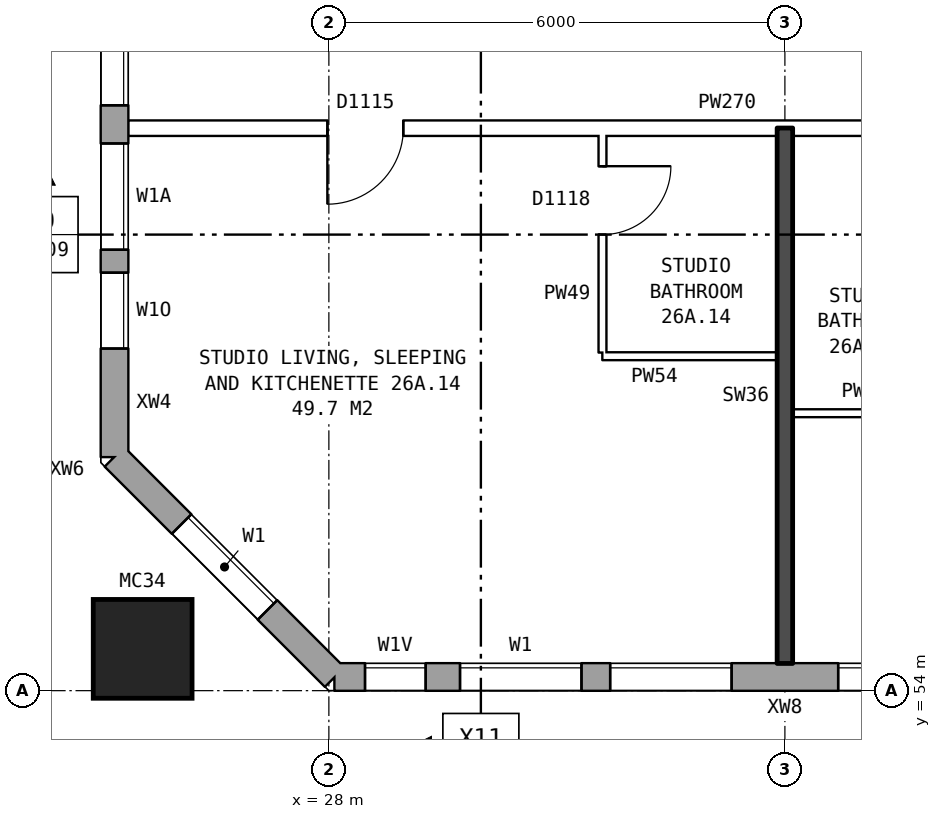
"""IFC4 building model, lengths in metres.
Left out: names, types, materials, properties, quantities, classifications, styles, units other than length and angle.
Written with IfcOpenShell. Run it as: python <this file> out.ifc"""

import sys

from ifc_helpers import new_model, si_unit, direction, frame, frame_2d, origin, origin_2d, place, context, subcontext, project, spatial, rectangle, hollow_rectangle, extrude, element, fill, save


model = new_model("IFC4")
c1 = context("Model", 3, precision=1e-05, world=origin(), true_north=direction((0.0, 1.0)))
c2 = subcontext(c1, "Body", "Model", "MODEL_VIEW")
j1 = project(units=[si_unit("LENGTHUNIT", "METRE"), si_unit("PLANEANGLEUNIT", "RADIAN")], contexts=[c1])
p1 = place(None, origin())
s1 = spatial("IfcSite", under=j1, at=p1, CompositionType="ELEMENT")
p2 = place(p1, origin())
s2 = spatial("IfcBuilding", under=s1, at=p2, CompositionType="ELEMENT")
p3 = place(p2, frame((0.0, 0.0, 96.4)))
s3 = spatial("IfcBuildingStorey", under=s2, at=p3, CompositionType="ELEMENT", Elevation=96.4)
p4 = place(p3, frame((25.55, 54.55, 0.0), z_axis=(0.0, 0.0, 1.0), x_axis=(1.0, 0.0, 0.0)))
e1 = element("IfcColumn", 1, at=p4, inside=s3, PredefinedType="COLUMN", context=c2, shape_type="SweptSolid", body=[
    extrude(hollow_rectangle(XDim=1.3, YDim=1.3, WallThickness=0.07, at=origin_2d()), origin(), (0.0, 0.0, 1.0), 3.1),
])
p5 = place(p3, frame((25.18, 57.075, 0.0), z_axis=(0.0, 0.0, 1.0), x_axis=(0.707106781187, -0.707106781187, 0.0)))
e2 = element("IfcWall", 2, at=p5, inside=s3, PredefinedType="STANDARD", context=c2, shape_type="SweptSolid", body=[
    extrude(rectangle(XDim=4.094, YDim=0.36, at=frame_2d((2.047, 0.0))), origin(), (0.0, 0.0, 1.0), 2.85),
])
p6 = place(p5, frame((1.247, 0.0, 0.8)))
e3 = element("IfcOpeningElement", 3, at=p6, cuts=e2, PredefinedType="OPENING", context=c2, shape_type="SweptSolid", body=[
    extrude(rectangle(XDim=1.6, YDim=1.8, at=frame_2d((0.8, 0.9))), frame((0.0, 0.19, 0.0), z_axis=(0.0, -1.0, 0.0), x_axis=(1.0, 0.0, 0.0)), (0.0, 0.0, 1.0), 0.38),
])
p7 = place(p3, frame((28.075, 54.18, 0.0), z_axis=(0.0, 0.0, 1.0), x_axis=(1.0, 0.0, 0.0)))
e4 = element("IfcWall", 4, at=p7, inside=s3, PredefinedType="STANDARD", context=c2, shape_type="SweptSolid", body=[
    extrude(rectangle(XDim=44.851, YDim=0.36, at=frame_2d((22.425, 0.0))), origin(), (0.0, 0.0, 1.0), 2.85),
])
p8 = place(p7, frame((0.4, 0.0, 0.8)))
e5 = element("IfcOpeningElement", 5, at=p8, cuts=e4, PredefinedType="OPENING", context=c2, shape_type="SweptSolid", body=[
    extrude(rectangle(XDim=0.8, YDim=0.9, at=frame_2d((0.4, 0.45))), frame((0.0, 0.19, 0.0), z_axis=(0.0, -1.0, 0.0), x_axis=(1.0, 0.0, 0.0)), (0.0, 0.0, 1.0), 0.38),
])
p9 = place(p7, frame((3.625, 0.0, 0.8)))
e6 = element("IfcOpeningElement", 6, at=p9, cuts=e4, PredefinedType="OPENING", context=c2, shape_type="SweptSolid", body=[
    extrude(rectangle(XDim=1.6, YDim=1.8, at=frame_2d((0.8, 0.9))), frame((0.0, 0.19, 0.0), z_axis=(0.0, -1.0, 0.0), x_axis=(1.0, 0.0, 0.0)), (0.0, 0.0, 1.0), 0.38),
])
p10 = place(p7, frame((6.625, 0.0, 0.8)))
e7 = element("IfcOpeningElement", 7, at=p10, cuts=e4, PredefinedType="OPENING", context=c2, shape_type="SweptSolid", body=[
    extrude(rectangle(XDim=1.6, YDim=1.8, at=frame_2d((0.8, 0.9))), frame((0.0, 0.19, 0.0), z_axis=(0.0, -1.0, 0.0), x_axis=(1.0, 0.0, 0.0)), (0.0, 0.0, 1.0), 0.38),
])
p11 = place(p7, frame((9.625, 0.0, 0.8)))
e8 = element("IfcOpeningElement", 8, at=p11, cuts=e4, PredefinedType="OPENING", context=c2, shape_type="SweptSolid", body=[
    extrude(rectangle(XDim=1.6, YDim=1.8, at=frame_2d((0.8, 0.9))), frame((0.0, 0.19, 0.0), z_axis=(0.0, -1.0, 0.0), x_axis=(1.0, 0.0, 0.0)), (0.0, 0.0, 1.0), 0.38),
])
p12 = place(p7, frame((12.625, 0.0, 0.8)))
e9 = element("IfcOpeningElement", 9, at=p12, cuts=e4, PredefinedType="OPENING", context=c2, shape_type="SweptSolid", body=[
    extrude(rectangle(XDim=1.6, YDim=1.8, at=frame_2d((0.8, 0.9))), frame((0.0, 0.19, 0.0), z_axis=(0.0, -1.0, 0.0), x_axis=(1.0, 0.0, 0.0)), (0.0, 0.0, 1.0), 0.38),
])
p13 = place(p7, frame((15.625, 0.0, 0.8)))
e10 = element("IfcOpeningElement", 10, at=p13, cuts=e4, PredefinedType="OPENING", context=c2, shape_type="SweptSolid", body=[
    extrude(rectangle(XDim=1.6, YDim=1.8, at=frame_2d((0.8, 0.9))), frame((0.0, 0.19, 0.0), z_axis=(0.0, -1.0, 0.0), x_axis=(1.0, 0.0, 0.0)), (0.0, 0.0, 1.0), 0.38),
])
p14 = place(p7, frame((18.625, 0.0, 0.8)))
e11 = element("IfcOpeningElement", 11, at=p14, cuts=e4, PredefinedType="OPENING", context=c2, shape_type="SweptSolid", body=[
    extrude(rectangle(XDim=1.6, YDim=1.8, at=frame_2d((0.8, 0.9))), frame((0.0, 0.19, 0.0), z_axis=(0.0, -1.0, 0.0), x_axis=(1.0, 0.0, 0.0)), (0.0, 0.0, 1.0), 0.38),
])
p15 = place(p7, frame((21.625, 0.0, 0.8)))
e12 = element("IfcOpeningElement", 12, at=p15, cuts=e4, PredefinedType="OPENING", context=c2, shape_type="SweptSolid", body=[
    extrude(rectangle(XDim=1.6, YDim=1.8, at=frame_2d((0.8, 0.9))), frame((0.0, 0.19, 0.0), z_axis=(0.0, -1.0, 0.0), x_axis=(1.0, 0.0, 0.0)), (0.0, 0.0, 1.0), 0.38),
])
p16 = place(p7, frame((24.625, 0.0, 0.8)))
e13 = element("IfcOpeningElement", 13, at=p16, cuts=e4, PredefinedType="OPENING", context=c2, shape_type="SweptSolid", body=[
    extrude(rectangle(XDim=1.6, YDim=1.8, at=frame_2d((0.8, 0.9))), frame((0.0, 0.19, 0.0), z_axis=(0.0, -1.0, 0.0), x_axis=(1.0, 0.0, 0.0)), (0.0, 0.0, 1.0), 0.38),
])
p17 = place(p7, frame((27.625, 0.0, 0.8)))
e14 = element("IfcOpeningElement", 14, at=p17, cuts=e4, PredefinedType="OPENING", context=c2, shape_type="SweptSolid", body=[
    extrude(rectangle(XDim=1.6, YDim=1.8, at=frame_2d((0.8, 0.9))), frame((0.0, 0.19, 0.0), z_axis=(0.0, -1.0, 0.0), x_axis=(1.0, 0.0, 0.0)), (0.0, 0.0, 1.0), 0.38),
])
p18 = place(p7, frame((30.625, 0.0, 0.8)))
e15 = element("IfcOpeningElement", 15, at=p18, cuts=e4, PredefinedType="OPENING", context=c2, shape_type="SweptSolid", body=[
    extrude(rectangle(XDim=1.6, YDim=1.8, at=frame_2d((0.8, 0.9))), frame((0.0, 0.19, 0.0), z_axis=(0.0, -1.0, 0.0), x_axis=(1.0, 0.0, 0.0)), (0.0, 0.0, 1.0), 0.38),
])
p19 = place(p7, frame((33.625, 0.0, 0.8)))
e16 = element("IfcOpeningElement", 16, at=p19, cuts=e4, PredefinedType="OPENING", context=c2, shape_type="SweptSolid", body=[
    extrude(rectangle(XDim=1.6, YDim=1.8, at=frame_2d((0.8, 0.9))), frame((0.0, 0.19, 0.0), z_axis=(0.0, -1.0, 0.0), x_axis=(1.0, 0.0, 0.0)), (0.0, 0.0, 1.0), 0.38),
])
p20 = place(p7, frame((36.625, 0.0, 0.8)))
e17 = element("IfcOpeningElement", 17, at=p20, cuts=e4, PredefinedType="OPENING", context=c2, shape_type="SweptSolid", body=[
    extrude(rectangle(XDim=1.6, YDim=1.8, at=frame_2d((0.8, 0.9))), frame((0.0, 0.19, 0.0), z_axis=(0.0, -1.0, 0.0), x_axis=(1.0, 0.0, 0.0)), (0.0, 0.0, 1.0), 0.38),
])
p21 = place(p7, frame((39.625, 0.0, 0.8)))
e18 = element("IfcOpeningElement", 18, at=p21, cuts=e4, PredefinedType="OPENING", context=c2, shape_type="SweptSolid", body=[
    extrude(rectangle(XDim=1.6, YDim=1.8, at=frame_2d((0.8, 0.9))), frame((0.0, 0.19, 0.0), z_axis=(0.0, -1.0, 0.0), x_axis=(1.0, 0.0, 0.0)), (0.0, 0.0, 1.0), 0.38),
])
p22 = place(p7, frame((42.125, 0.0, 0.8)))
e19 = element("IfcOpeningElement", 19, at=p22, cuts=e4, PredefinedType="OPENING", context=c2, shape_type="SweptSolid", body=[
    extrude(rectangle(XDim=1.0, YDim=1.8, at=frame_2d((0.5, 0.9))), frame((0.0, 0.19, 0.0), z_axis=(0.0, -1.0, 0.0), x_axis=(1.0, 0.0, 0.0)), (0.0, 0.0, 1.0), 0.38),
])
p23 = place(p7, frame((1.65, 0.0, 0.8)))
e20 = element("IfcOpeningElement", 20, at=p23, cuts=e4, PredefinedType="OPENING", context=c2, shape_type="SweptSolid", body=[
    extrude(rectangle(XDim=1.6, YDim=1.8, at=frame_2d((0.8, 0.9))), frame((0.0, 0.19, 0.0), z_axis=(0.0, -1.0, 0.0), x_axis=(1.0, 0.0, 0.0)), (0.0, 0.0, 1.0), 0.38),
])
p24 = place(p7, frame((43.425, 0.0, 0.8)))
e21 = element("IfcOpeningElement", 21, at=p24, cuts=e4, PredefinedType="OPENING", context=c2, shape_type="SweptSolid", body=[
    extrude(rectangle(XDim=1.0, YDim=0.9, at=frame_2d((0.5, 0.45))), frame((0.0, 0.19, 0.0), z_axis=(0.0, -1.0, 0.0), x_axis=(1.0, 0.0, 0.0)), (0.0, 0.0, 1.0), 0.38),
])
p25 = place(p3, frame((25.18, 82.925, 0.0), z_axis=(0.0, 0.0, 1.0), x_axis=(0.0, -1.0, 0.0)))
e22 = element("IfcWall", 22, at=p25, inside=s3, PredefinedType="STANDARD", context=c2, shape_type="SweptSolid", body=[
    extrude(rectangle(XDim=25.851, YDim=0.36, at=frame_2d((12.925, 0.0))), origin(), (0.0, 0.0, 1.0), 2.85),
])
p26 = place(p25, frame((0.9, 0.0, 0.8)))
e23 = element("IfcOpeningElement", 23, at=p26, cuts=e22, PredefinedType="OPENING", context=c2, shape_type="SweptSolid", body=[
    extrude(rectangle(XDim=0.8, YDim=0.9, at=frame_2d((0.4, 0.45))), frame((0.0, 0.19, 0.0), z_axis=(0.0, -1.0, 0.0), x_axis=(1.0, 0.0, 0.0)), (0.0, 0.0, 1.0), 0.38),
])
p27 = place(p25, frame((4.625, 0.0, 0.8)))
e24 = element("IfcOpeningElement", 24, at=p27, cuts=e22, PredefinedType="OPENING", context=c2, shape_type="SweptSolid", body=[
    extrude(rectangle(XDim=1.6, YDim=1.8, at=frame_2d((0.8, 0.9))), frame((0.0, 0.19, 0.0), z_axis=(0.0, -1.0, 0.0), x_axis=(1.0, 0.0, 0.0)), (0.0, 0.0, 1.0), 0.38),
])
p28 = place(p25, frame((7.625, 0.0, 0.8)))
e25 = element("IfcOpeningElement", 25, at=p28, cuts=e22, PredefinedType="OPENING", context=c2, shape_type="SweptSolid", body=[
    extrude(rectangle(XDim=1.6, YDim=1.8, at=frame_2d((0.8, 0.9))), frame((0.0, 0.19, 0.0), z_axis=(0.0, -1.0, 0.0), x_axis=(1.0, 0.0, 0.0)), (0.0, 0.0, 1.0), 0.38),
])
p29 = place(p25, frame((10.625, 0.0, 0.8)))
e26 = element("IfcOpeningElement", 26, at=p29, cuts=e22, PredefinedType="OPENING", context=c2, shape_type="SweptSolid", body=[
    extrude(rectangle(XDim=1.6, YDim=1.8, at=frame_2d((0.8, 0.9))), frame((0.0, 0.19, 0.0), z_axis=(0.0, -1.0, 0.0), x_axis=(1.0, 0.0, 0.0)), (0.0, 0.0, 1.0), 0.38),
])
p30 = place(p25, frame((13.625, 0.0, 0.8)))
e27 = element("IfcOpeningElement", 27, at=p30, cuts=e22, PredefinedType="OPENING", context=c2, shape_type="SweptSolid", body=[
    extrude(rectangle(XDim=1.6, YDim=1.8, at=frame_2d((0.8, 0.9))), frame((0.0, 0.19, 0.0), z_axis=(0.0, -1.0, 0.0), x_axis=(1.0, 0.0, 0.0)), (0.0, 0.0, 1.0), 0.38),
])
p31 = place(p25, frame((16.625, 0.0, 0.8)))
e28 = element("IfcOpeningElement", 28, at=p31, cuts=e22, PredefinedType="OPENING", context=c2, shape_type="SweptSolid", body=[
    extrude(rectangle(XDim=1.6, YDim=1.8, at=frame_2d((0.8, 0.9))), frame((0.0, 0.19, 0.0), z_axis=(0.0, -1.0, 0.0), x_axis=(1.0, 0.0, 0.0)), (0.0, 0.0, 1.0), 0.38),
])
p32 = place(p25, frame((19.625, 0.0, 0.8)))
e29 = element("IfcOpeningElement", 29, at=p32, cuts=e22, PredefinedType="OPENING", context=c2, shape_type="SweptSolid", body=[
    extrude(rectangle(XDim=1.6, YDim=1.8, at=frame_2d((0.8, 0.9))), frame((0.0, 0.19, 0.0), z_axis=(0.0, -1.0, 0.0), x_axis=(1.0, 0.0, 0.0)), (0.0, 0.0, 1.0), 0.38),
])
p33 = place(p25, frame((21.725, 0.0, 0.8)))
e30 = element("IfcOpeningElement", 30, at=p33, cuts=e22, PredefinedType="OPENING", context=c2, shape_type="SweptSolid", body=[
    extrude(rectangle(XDim=1.4, YDim=1.8, at=frame_2d((0.7, 0.9))), frame((0.0, 0.19, 0.0), z_axis=(0.0, -1.0, 0.0), x_axis=(1.0, 0.0, 0.0)), (0.0, 0.0, 1.0), 0.38),
])
p34 = place(p25, frame((2.0, 0.0, 0.8)))
e31 = element("IfcOpeningElement", 31, at=p34, cuts=e22, PredefinedType="OPENING", context=c2, shape_type="SweptSolid", body=[
    extrude(rectangle(XDim=0.8, YDim=1.5, at=frame_2d((0.4, 0.75))), frame((0.0, 0.19, 0.0), z_axis=(0.0, -1.0, 0.0), x_axis=(1.0, 0.0, 0.0)), (0.0, 0.0, 1.0), 0.38),
])
p35 = place(p25, frame((3.1, 0.0, 0.8)))
e32 = element("IfcOpeningElement", 32, at=p35, cuts=e22, PredefinedType="OPENING", context=c2, shape_type="SweptSolid", body=[
    extrude(rectangle(XDim=1.0, YDim=1.8, at=frame_2d((0.5, 0.9))), frame((0.0, 0.19, 0.0), z_axis=(0.0, -1.0, 0.0), x_axis=(1.0, 0.0, 0.0)), (0.0, 0.0, 1.0), 0.38),
])
p36 = place(p25, frame((23.425, 0.0, 0.8)))
e33 = element("IfcOpeningElement", 33, at=p36, cuts=e22, PredefinedType="OPENING", context=c2, shape_type="SweptSolid", body=[
    extrude(rectangle(XDim=1.0, YDim=1.2, at=frame_2d((0.5, 0.6))), frame((0.0, 0.19, 0.0), z_axis=(0.0, -1.0, 0.0), x_axis=(1.0, 0.0, 0.0)), (0.0, 0.0, 1.0), 0.38),
])
p37 = place(p3, frame((34.1, 57.65, 0.0), z_axis=(0.0, 0.0, 1.0), x_axis=(1.0, 0.0, 0.0)))
e34 = element("IfcWall", 34, at=p37, inside=s3, PredefinedType="PARTITIONING", context=c2, shape_type="SweptSolid", body=[
    extrude(rectangle(XDim=1.9, YDim=0.1, at=frame_2d((0.95, 0.0))), origin(), (0.0, 0.0, 1.0), 2.85),
])
p38 = place(p3, frame((31.6, 58.4, 0.0), z_axis=(0.0, 0.0, 1.0), x_axis=(1.0, 0.0, 0.0)))
e35 = element("IfcWall", 35, at=p38, inside=s3, PredefinedType="PARTITIONING", context=c2, shape_type="SweptSolid", body=[
    extrude(rectangle(XDim=2.3, YDim=0.1, at=frame_2d((1.15, 0.0))), origin(), (0.0, 0.0, 1.0), 2.85),
])
p39 = place(p3, frame((25.36, 61.4, 0.0), z_axis=(0.0, 0.0, 1.0), x_axis=(1.0, 0.0, 0.0)))
e36 = element("IfcWall", 36, at=p39, inside=s3, PredefinedType="PARTITIONING", context=c2, shape_type="SweptSolid", body=[
    extrude(rectangle(XDim=20.54, YDim=0.2, at=frame_2d((10.27, 0.0))), origin(), (0.0, 0.0, 1.0), 2.85),
])
p40 = place(p39, frame((18.09, 0.0, 0.0)))
e37 = element("IfcOpeningElement", 37, at=p40, cuts=e36, PredefinedType="OPENING", context=c2, shape_type="SweptSolid", body=[
    extrude(rectangle(XDim=1.0, YDim=2.1, at=frame_2d((0.5, 1.05))), frame((0.0, 0.11, 0.0), z_axis=(0.0, -1.0, 0.0), x_axis=(1.0, 0.0, 0.0)), (0.0, 0.0, 1.0), 0.22),
])
p41 = place(p39, frame((12.14, 0.0, 0.0)))
e38 = element("IfcOpeningElement", 38, at=p41, cuts=e36, PredefinedType="OPENING", context=c2, shape_type="SweptSolid", body=[
    extrude(rectangle(XDim=1.0, YDim=2.1, at=frame_2d((0.5, 1.05))), frame((0.0, 0.11, 0.0), z_axis=(0.0, -1.0, 0.0), x_axis=(1.0, 0.0, 0.0)), (0.0, 0.0, 1.0), 0.22),
])
p42 = place(p39, frame((2.62, 0.0, 0.0)))
e39 = element("IfcOpeningElement", 39, at=p42, cuts=e36, PredefinedType="OPENING", context=c2, shape_type="SweptSolid", body=[
    extrude(rectangle(XDim=1.0, YDim=2.1, at=frame_2d((0.5, 1.05))), frame((0.0, 0.11, 0.0), z_axis=(0.0, -1.0, 0.0), x_axis=(1.0, 0.0, 0.0)), (0.0, 0.0, 1.0), 0.22),
])
p43 = place(p3, frame((31.6, 58.45, 0.0), z_axis=(0.0, 0.0, 1.0), x_axis=(0.0, 1.0, 0.0)))
e40 = element("IfcWall", 40, at=p43, inside=s3, PredefinedType="PARTITIONING", context=c2, shape_type="SweptSolid", body=[
    extrude(rectangle(XDim=2.85, YDim=0.1, at=frame_2d((1.425, 0.0))), origin(), (0.0, 0.0, 1.0), 2.85),
])
p44 = place(p43, frame((1.55, 0.0, 0.0)))
e41 = element("IfcOpeningElement", 41, at=p44, cuts=e40, PredefinedType="OPENING", context=c2, shape_type="SweptSolid", body=[
    extrude(rectangle(XDim=0.9, YDim=2.1, at=frame_2d((0.45, 1.05))), frame((0.0, 0.06, 0.0), z_axis=(0.0, -1.0, 0.0), x_axis=(1.0, 0.0, 0.0)), (0.0, 0.0, 1.0), 0.12),
])
p45 = place(p3, frame((34.0, 54.36, 0.0), z_axis=(0.0, 0.0, 1.0), x_axis=(0.0, 1.0, 0.0)))
e42 = element("IfcWall", 42, at=p45, inside=s3, PredefinedType="SOLIDWALL", context=c2, shape_type="SweptSolid", body=[
    extrude(rectangle(XDim=7.04, YDim=0.2, at=frame_2d((3.52, 0.0))), origin(), (0.0, 0.0, 1.0), 2.85),
])
p46 = place(p6, origin())
e43 = element("IfcWindow", 43, at=p46, inside=s3, PartitioningType="SINGLE_PANEL", PredefinedType="WINDOW", context=c2, shape_type="SweptSolid", body=[
    extrude(rectangle(XDim=1.6, YDim=1.8, at=frame_2d((0.8, 0.9))), frame((0.0, 0.15, 0.0), z_axis=(0.0, -1.0, 0.0), x_axis=(1.0, 0.0, 0.0)), (0.0, 0.0, 1.0), 0.06),
])
fill(e3, e43)
p47 = place(p8, origin())
e44 = element("IfcWindow", 44, at=p47, inside=s3, PartitioningType="SINGLE_PANEL", PredefinedType="WINDOW", context=c2, shape_type="SweptSolid", body=[
    extrude(rectangle(XDim=0.8, YDim=0.9, at=frame_2d((0.4, 0.45))), frame((0.0, 0.15, 0.0), z_axis=(0.0, -1.0, 0.0), x_axis=(1.0, 0.0, 0.0)), (0.0, 0.0, 1.0), 0.06),
])
fill(e5, e44)
p48 = place(p9, origin())
e45 = element("IfcWindow", 45, at=p48, inside=s3, PartitioningType="SINGLE_PANEL", PredefinedType="WINDOW", context=c2, shape_type="SweptSolid", body=[
    extrude(rectangle(XDim=1.6, YDim=1.8, at=frame_2d((0.8, 0.9))), frame((0.0, 0.15, 0.0), z_axis=(0.0, -1.0, 0.0), x_axis=(1.0, 0.0, 0.0)), (0.0, 0.0, 1.0), 0.06),
])
fill(e6, e45)
p49 = place(p10, origin())
e46 = element("IfcWindow", 46, at=p49, inside=s3, PartitioningType="SINGLE_PANEL", PredefinedType="WINDOW", context=c2, shape_type="SweptSolid", body=[
    extrude(rectangle(XDim=1.6, YDim=1.8, at=frame_2d((0.8, 0.9))), frame((0.0, 0.15, 0.0), z_axis=(0.0, -1.0, 0.0), x_axis=(1.0, 0.0, 0.0)), (0.0, 0.0, 1.0), 0.06),
])
fill(e7, e46)
p50 = place(p32, origin())
e47 = element("IfcWindow", 47, at=p50, inside=s3, PartitioningType="SINGLE_PANEL", PredefinedType="WINDOW", context=c2, shape_type="SweptSolid", body=[
    extrude(rectangle(XDim=1.6, YDim=1.8, at=frame_2d((0.8, 0.9))), frame((0.0, 0.15, 0.0), z_axis=(0.0, -1.0, 0.0), x_axis=(1.0, 0.0, 0.0)), (0.0, 0.0, 1.0), 0.06),
])
fill(e29, e47)
p51 = place(p33, origin())
e48 = element("IfcWindow", 48, at=p51, inside=s3, PartitioningType="SINGLE_PANEL", PredefinedType="WINDOW", context=c2, shape_type="SweptSolid", body=[
    extrude(rectangle(XDim=1.4, YDim=1.8, at=frame_2d((0.7, 0.9))), frame((0.0, 0.15, 0.0), z_axis=(0.0, -1.0, 0.0), x_axis=(1.0, 0.0, 0.0)), (0.0, 0.0, 1.0), 0.06),
])
fill(e30, e48)
p52 = place(p42, frame((1.0, 0.0, 0.0), z_axis=(0.0, 0.0, 1.0), x_axis=(-1.0, 0.0, 0.0)))
e49 = element("IfcDoor", 49, at=p52, inside=s3, OperationType="SINGLE_SWING_RIGHT", PredefinedType="DOOR", context=c2, shape_type="SweptSolid", body=[
    extrude(rectangle(XDim=1.0, YDim=2.1, at=frame_2d((0.5, 1.05))), frame((0.0, 0.025, 0.0), z_axis=(0.0, -1.0, 0.0), x_axis=(1.0, 0.0, 0.0)), (0.0, 0.0, 1.0), 0.05),
])
fill(e39, e49)
p53 = place(p44, frame((0.9, 0.0, 0.0), z_axis=(0.0, 0.0, 1.0), x_axis=(-1.0, 0.0, 0.0)))
e50 = element("IfcDoor", 50, at=p53, inside=s3, OperationType="SINGLE_SWING_LEFT", PredefinedType="DOOR", context=c2, shape_type="SweptSolid", body=[
    extrude(rectangle(XDim=0.9, YDim=2.1, at=frame_2d((0.45, 1.05))), frame((0.0, 0.025, 0.0), z_axis=(0.0, -1.0, 0.0), x_axis=(1.0, 0.0, 0.0)), (0.0, 0.0, 1.0), 0.05),
])
fill(e41, e50)
p54 = place(p23, origin())
e51 = element("IfcWindow", 51, at=p54, inside=s3, PartitioningType="SINGLE_PANEL", PredefinedType="WINDOW", context=c2, shape_type="SweptSolid", body=[
    extrude(rectangle(XDim=1.6, YDim=1.8, at=frame_2d((0.8, 0.9))), frame((0.0, 0.15, 0.0), z_axis=(0.0, -1.0, 0.0), x_axis=(1.0, 0.0, 0.0)), (0.0, 0.0, 1.0), 0.06),
])
fill(e20, e51)
p55 = place(p36, origin())
e52 = element("IfcWindow", 52, at=p55, inside=s3, PartitioningType="SINGLE_PANEL", PredefinedType="WINDOW", context=c2, shape_type="SweptSolid", body=[
    extrude(rectangle(XDim=1.0, YDim=1.2, at=frame_2d((0.5, 0.6))), frame((0.0, 0.15, 0.0), z_axis=(0.0, -1.0, 0.0), x_axis=(1.0, 0.0, 0.0)), (0.0, 0.0, 1.0), 0.06),
])
fill(e33, e52)
save(model, sys.argv[1])
